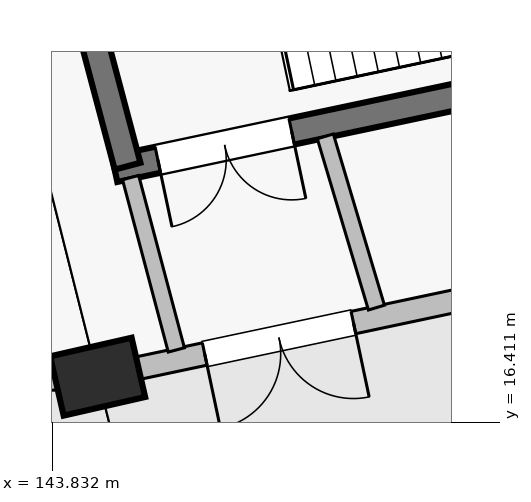
"""IFC4 building model, lengths in metres.
Left out: names, types, materials, properties, quantities, classifications, styles, units other than length and angle.
Written with IfcOpenShell. Run it as: python <this file> out.ifc"""

import sys

from ifc_helpers import new_model, si_unit, direction, frame, frame_2d, origin, origin_2d, place, context, subcontext, project, spatial, rectangle, extrude, element, fill, save


model = new_model("IFC4")
c1 = context("Model", 3, precision=1e-05, world=origin(), true_north=direction((0.0, 1.0)))
c2 = subcontext(c1, "Body", "Model", "MODEL_VIEW")
j1 = project(units=[si_unit("LENGTHUNIT", "METRE"), si_unit("PLANEANGLEUNIT", "RADIAN")], contexts=[c1])
p1 = place(None, origin())
s1 = spatial("IfcSite", under=j1, at=p1, CompositionType="ELEMENT")
p2 = place(p1, origin())
s2 = spatial("IfcBuilding", under=s1, at=p2, CompositionType="ELEMENT")
p3 = place(p2, origin())
s3 = spatial("IfcBuildingStorey", under=s2, at=p3, CompositionType="ELEMENT", Elevation=0.0)
p4 = place(p3, frame((144.428, 17.013, 0.0), z_axis=(0.0, 0.0, 1.0), x_axis=(0.222520933954, -0.974927912182, 0.0)))
e1 = element("IfcColumn", 1, at=p4, inside=s3, PredefinedType="COLUMN", context=c2, shape_type="SweptSolid", body=[
    extrude(rectangle(XDim=0.8, YDim=1.1, at=origin_2d()), origin(), (0.0, 0.0, 1.0), 5.78),
])
p5 = place(p3, frame((123.39, 16.018, 0.0), z_axis=(0.0, 0.0, 1.0), x_axis=(0.998884033728, 0.047230150999, 0.0)))
e2 = element("IfcWall", 2, at=p5, inside=s3, PredefinedType="SOLIDWALL", context=c2, shape_type="SweptSolid", body=[
    extrude(rectangle(XDim=20.671, YDim=0.3, at=frame_2d((10.336, 0.0))), origin(), (0.0, 0.0, 1.0), 4.8),
])
p6 = place(p5, frame((8.636, 0.0, 0.0)))
e3 = element("IfcOpeningElement", 3, at=p6, cuts=e2, PredefinedType="OPENING", context=c2, shape_type="SweptSolid", body=[
    extrude(rectangle(XDim=3.4, YDim=2.6, at=frame_2d((1.7, 1.3))), frame((0.0, 0.16, 0.0), z_axis=(0.0, -1.0, 0.0), x_axis=(1.0, 0.0, 0.0)), (0.0, 0.0, 1.0), 0.32),
])
p7 = place(p5, frame((5.336, 0.0, 1.1)))
e4 = element("IfcOpeningElement", 4, at=p7, cuts=e2, PredefinedType="OPENING", context=c2, shape_type="SweptSolid", body=[
    extrude(rectangle(XDim=2.4, YDim=1.8, at=frame_2d((1.2, 0.9))), frame((0.0, 0.16, 0.0), z_axis=(0.0, -1.0, 0.0), x_axis=(1.0, 0.0, 0.0)), (0.0, 0.0, 1.0), 0.32),
])
p8 = place(p3, frame((144.809, 17.094, 0.0), z_axis=(0.0, 0.0, 1.0), x_axis=(0.978345100851, 0.206980346028, 0.0)))
e5 = element("IfcWall", 5, at=p8, inside=s3, PredefinedType="SOLIDWALL", context=c2, shape_type="SweptSolid", body=[
    extrude(rectangle(XDim=21.07, YDim=0.3, at=frame_2d((10.535, 0.0))), origin(), (0.0, 0.0, 1.0), 4.8),
])
p9 = place(p8, frame((1.05, 0.0, 0.0)))
e6 = element("IfcOpeningElement", 6, at=p9, cuts=e5, PredefinedType="OPENING", context=c2, shape_type="SweptSolid", body=[
    extrude(rectangle(XDim=2.0, YDim=2.3, at=frame_2d((1.0, 1.15))), frame((0.0, 0.16, 0.0), z_axis=(0.0, -1.0, 0.0), x_axis=(1.0, 0.0, 0.0)), (0.0, 0.0, 1.0), 0.32),
])
p10 = place(p3, frame((144.65, 19.746, 0.0), z_axis=(0.0, 0.0, 1.0), x_axis=(0.978345119536, 0.206980257705, 0.0)))
e7 = element("IfcWall", 7, at=p10, inside=s3, PredefinedType="SHEAR", context=c2, shape_type="SweptSolid", body=[
    extrude(rectangle(XDim=13.067, YDim=0.35, at=frame_2d((6.533, 0.0))), origin(), (0.0, 0.0, 1.0), 5.5),
])
p11 = place(p10, frame((0.582, 0.0, 0.0)))
e8 = element("IfcOpeningElement", 8, at=p11, cuts=e7, PredefinedType="OPENING", context=c2, shape_type="SweptSolid", body=[
    extrude(rectangle(XDim=1.8, YDim=2.2, at=frame_2d((0.9, 1.1))), frame((0.0, 0.185, 0.0), z_axis=(0.0, -1.0, 0.0), x_axis=(1.0, 0.0, 0.0)), (0.0, 0.0, 1.0), 0.37),
])
p12 = place(p3, frame((144.861, 19.632, 0.0), z_axis=(0.0, 0.0, 1.0), x_axis=(0.256541848889, -0.966533123989, 0.0)))
e9 = element("IfcWall", 9, at=p12, inside=s3, PredefinedType="SOLIDWALL", context=c2, shape_type="SweptSolid", body=[
    extrude(rectangle(XDim=2.346, YDim=0.22, at=frame_2d((1.173, 0.0))), origin(), (0.0, 0.0, 1.0), 5.5),
])
p13 = place(p3, frame((147.424, 20.175, 0.0), z_axis=(0.0, 0.0, 1.0), x_axis=(0.285947304877, -0.958245343758, 0.0)))
e10 = element("IfcWall", 10, at=p13, inside=s3, PredefinedType="SOLIDWALL", context=c2, shape_type="SweptSolid", body=[
    extrude(rectangle(XDim=2.351, YDim=0.22, at=frame_2d((1.176, 0.0))), origin(), (0.0, 0.0, 1.0), 5.5),
])
p14 = place(p3, frame((143.067, 26.394, 0.0), z_axis=(0.0, 0.0, 1.0), x_axis=(0.256518400663, -0.966539347425, 0.0)))
e11 = element("IfcWall", 11, at=p14, inside=s3, PredefinedType="SHEAR", context=c2, shape_type="SweptSolid", body=[
    extrude(rectangle(XDim=6.84, YDim=0.35, at=frame_2d((3.42, 0.0))), origin(), (0.0, 0.0, 1.0), 5.5),
])
p15 = place(p9, frame((2.0, 0.0, 0.0), z_axis=(0.0, 0.0, 1.0), x_axis=(-1.0, 0.0, 0.0)))
e12 = element("IfcDoor", 12, at=p15, inside=s3, OperationType="DOUBLE_DOOR_SINGLE_SWING", PredefinedType="DOOR", context=c2, shape_type="SweptSolid", body=[
    extrude(rectangle(XDim=2.0, YDim=2.3, at=frame_2d((1.0, 1.15))), frame((0.0, 0.025, 0.0), z_axis=(0.0, -1.0, 0.0), x_axis=(1.0, 0.0, 0.0)), (0.0, 0.0, 1.0), 0.05),
])
fill(e6, e12)
p16 = place(p11, frame((1.8, 0.0, 0.0), z_axis=(0.0, 0.0, 1.0), x_axis=(-1.0, 0.0, 0.0)))
e13 = element("IfcDoor", 13, at=p16, inside=s3, OperationType="DOUBLE_DOOR_SINGLE_SWING", PredefinedType="DOOR", context=c2, shape_type="SweptSolid", body=[
    extrude(rectangle(XDim=1.8, YDim=2.2, at=frame_2d((0.9, 1.1))), frame((0.0, 0.025, 0.0), z_axis=(0.0, -1.0, 0.0), x_axis=(1.0, 0.0, 0.0)), (0.0, 0.0, 1.0), 0.05),
])
fill(e8, e13)
save(model, sys.argv[1])
